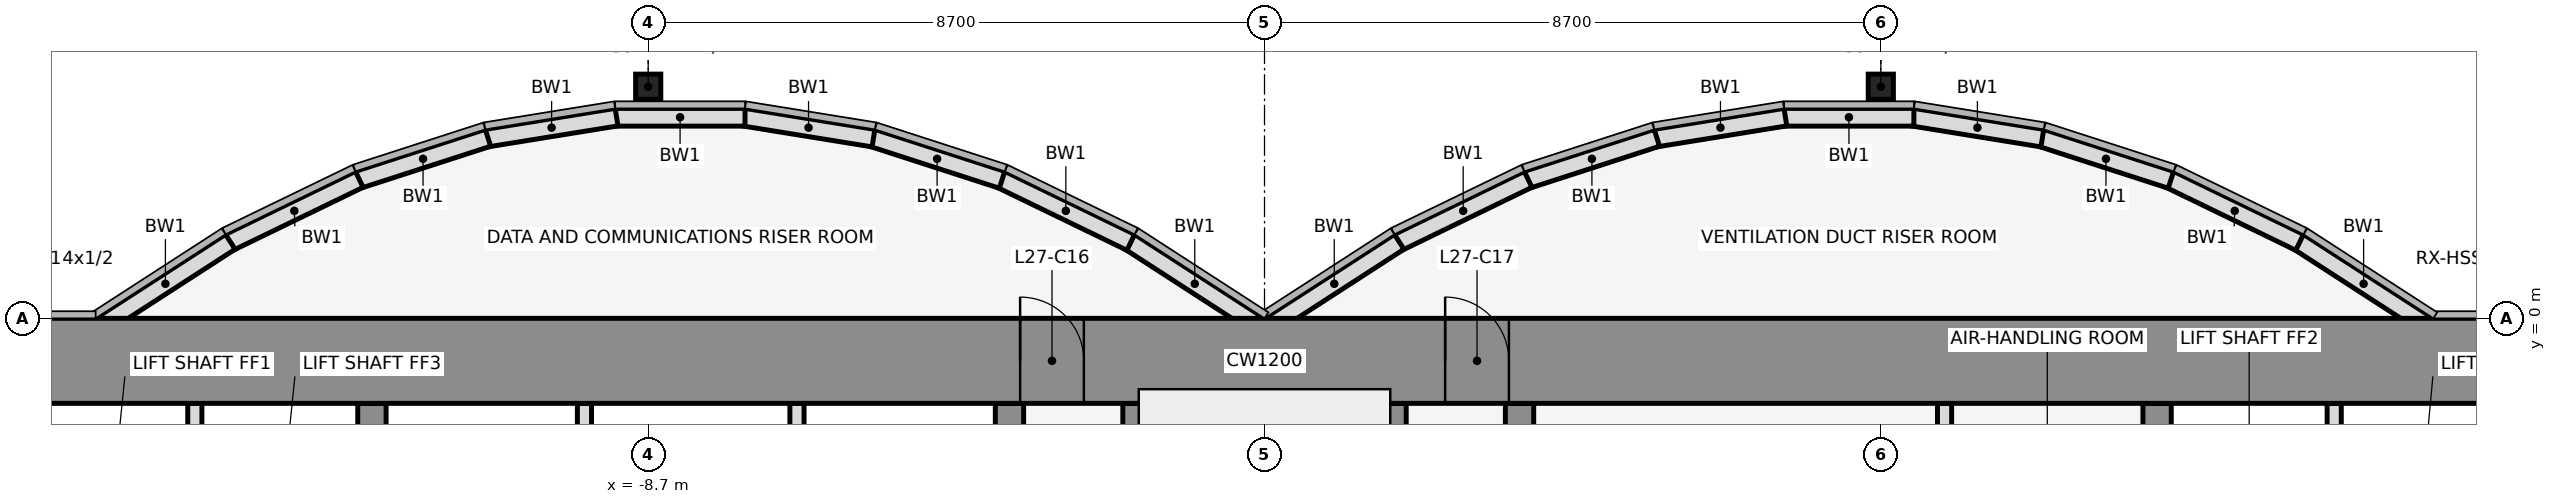
"""IFC4 building model, lengths in metres.
Left out: names, types, materials, properties, quantities, classifications, styles, units other than length and angle.
Written with IfcOpenShell. Run it as: python <this file> out.ifc"""

import sys

from ifc_helpers import new_model, si_unit, direction, frame, frame_2d, origin, origin_2d, place, context, subcontext, project, spatial, rectangle, hollow_rectangle, extrude, element, fill, save


model = new_model("IFC4")
c1 = context("Model", 3, precision=1e-05, world=origin(), true_north=direction((0.0, 1.0)))
c2 = subcontext(c1, "Body", "Model", "MODEL_VIEW")
j1 = project(units=[si_unit("LENGTHUNIT", "METRE"), si_unit("PLANEANGLEUNIT", "RADIAN")], contexts=[c1])
p1 = place(None, origin())
s1 = spatial("IfcSite", under=j1, at=p1, CompositionType="ELEMENT")
p2 = place(p1, origin())
s2 = spatial("IfcBuilding", under=s1, at=p2, CompositionType="ELEMENT")
p3 = place(p2, frame((0.0, 0.0, 126.8)))
s3 = spatial("IfcBuildingStorey", under=s2, at=p3, CompositionType="ELEMENT", Elevation=126.8)
for number, where, z_axis, x_axis in (
    (1, (-8.7, 3.269, 0.0), (0.0, 0.0, 1.0), (1.0, 0.0, 0.0)),
    (2, (8.7, 3.269, 0.0), (0.0, 0.0, 1.0), (1.0, 0.0, 0.0)),
):
    element("IfcColumn", number, at=place(p3, frame(where, z_axis=z_axis, x_axis=x_axis)), inside=s3, PredefinedType="COLUMN", context=c2, shape_type="SweptSolid", body=[
        extrude(hollow_rectangle(XDim=0.356, YDim=0.356, WallThickness=0.012, at=origin_2d()), origin(), (0.0, 0.0, 1.0), 4.1),
    ])
p4 = place(p3, frame((16.432, -0.105, 0.0), z_axis=(0.0, 0.0, 1.0), x_axis=(-0.83981312244, 0.542875602121, 0.0)))
e3 = element("IfcWall", 3, at=p4, inside=s3, PredefinedType="STANDARD", context=c2, shape_type="SweptSolid", body=[
    extrude(rectangle(XDim=2.183, YDim=0.25, at=frame_2d((1.091, 0.0))), origin(), (0.0, 0.0, 1.0), 3.95),
])
p5 = place(p3, frame((14.612, 1.073, 0.0), z_axis=(0.0, 0.0, 1.0), x_axis=(-0.89982408427, 0.436252928206, 0.0)))
e4 = element("IfcWall", 4, at=p5, inside=s3, PredefinedType="STANDARD", context=c2, shape_type="SweptSolid", body=[
    extrude(rectangle(XDim=2.038, YDim=0.25, at=frame_2d((1.019, 0.0))), origin(), (0.0, 0.0, 1.0), 3.95),
])
p6 = place(p3, frame((12.795, 1.955, 0.0), z_axis=(0.0, 0.0, 1.0), x_axis=(-0.951495806175, 0.307661714928, 0.0)))
e5 = element("IfcWall", 5, at=p6, inside=s3, PredefinedType="STANDARD", context=c2, shape_type="SweptSolid", body=[
    extrude(rectangle(XDim=1.927, YDim=0.25, at=frame_2d((0.963, 0.0))), origin(), (0.0, 0.0, 1.0), 3.95),
])
p7 = place(p3, frame((10.98, 2.543, 0.0), z_axis=(0.0, 0.0, 1.0), x_axis=(-0.987181718931, 0.159600293885, 0.0)))
e6 = element("IfcWall", 6, at=p7, inside=s3, PredefinedType="STANDARD", context=c2, shape_type="SweptSolid", body=[
    extrude(rectangle(XDim=1.857, YDim=0.25, at=frame_2d((0.929, 0.0))), origin(), (0.0, 0.0, 1.0), 3.95),
])
p8 = place(p3, frame((9.167, 2.838, 0.0), z_axis=(0.0, 0.0, 1.0), x_axis=(-1.0, 0.0, 0.0)))
e7 = element("IfcWall", 7, at=p8, inside=s3, PredefinedType="STANDARD", context=c2, shape_type="SweptSolid", body=[
    extrude(rectangle(XDim=1.833, YDim=0.25, at=frame_2d((0.917, 0.0))), origin(), (0.0, 0.0, 1.0), 3.95),
])
p9 = place(p3, frame((7.353, 2.84, 0.0), z_axis=(0.0, 0.0, 1.0), x_axis=(-0.987181718931, -0.159600293885, 0.0)))
e8 = element("IfcWall", 8, at=p9, inside=s3, PredefinedType="STANDARD", context=c2, shape_type="SweptSolid", body=[
    extrude(rectangle(XDim=1.857, YDim=0.25, at=frame_2d((0.929, 0.0))), origin(), (0.0, 0.0, 1.0), 3.95),
])
p10 = place(p3, frame((5.538, 2.548, 0.0), z_axis=(0.0, 0.0, 1.0), x_axis=(-0.951495806175, -0.307661714928, 0.0)))
e9 = element("IfcWall", 9, at=p10, inside=s3, PredefinedType="STANDARD", context=c2, shape_type="SweptSolid", body=[
    extrude(rectangle(XDim=1.927, YDim=0.25, at=frame_2d((0.963, 0.0))), origin(), (0.0, 0.0, 1.0), 3.95),
])
p11 = place(p3, frame((3.721, 1.962, 0.0), z_axis=(0.0, 0.0, 1.0), x_axis=(-0.89982408427, -0.436252928206, 0.0)))
e10 = element("IfcWall", 10, at=p11, inside=s3, PredefinedType="STANDARD", context=c2, shape_type="SweptSolid", body=[
    extrude(rectangle(XDim=2.038, YDim=0.25, at=frame_2d((1.019, 0.0))), origin(), (0.0, 0.0, 1.0), 3.95),
])
for number, where, z_axis, x_axis in (
    (11, (1.901, 1.08, 0.0), (0.0, 0.0, 1.0), (-0.84, -0.543, 0.0)),
    (12, (-0.068, -0.105, 0.0), (0.0, 0.0, 1.0), (-0.84, 0.543, 0.0)),
):
    element("IfcWall", number, at=place(p3, frame(where, z_axis=z_axis, x_axis=x_axis)), inside=s3, PredefinedType="STANDARD", context=c2, shape_type="SweptSolid", body=[
        extrude(rectangle(XDim=2.183, YDim=0.25, at=frame_2d((1.091, 0.0))), origin(), (0.0, 0.0, 1.0), 3.95),
    ])
p12 = place(p3, frame((-1.888, 1.073, 0.0), z_axis=(0.0, 0.0, 1.0), x_axis=(-0.89982408427, 0.436252928206, 0.0)))
e13 = element("IfcWall", 13, at=p12, inside=s3, PredefinedType="STANDARD", context=c2, shape_type="SweptSolid", body=[
    extrude(rectangle(XDim=2.038, YDim=0.25, at=frame_2d((1.019, 0.0))), origin(), (0.0, 0.0, 1.0), 3.95),
])
p13 = place(p3, frame((-3.705, 1.955, 0.0), z_axis=(0.0, 0.0, 1.0), x_axis=(-0.951495806175, 0.307661714928, 0.0)))
e14 = element("IfcWall", 14, at=p13, inside=s3, PredefinedType="STANDARD", context=c2, shape_type="SweptSolid", body=[
    extrude(rectangle(XDim=1.927, YDim=0.25, at=frame_2d((0.963, 0.0))), origin(), (0.0, 0.0, 1.0), 3.95),
])
p14 = place(p3, frame((-5.52, 2.543, 0.0), z_axis=(0.0, 0.0, 1.0), x_axis=(-0.987181718931, 0.159600293885, 0.0)))
e15 = element("IfcWall", 15, at=p14, inside=s3, PredefinedType="STANDARD", context=c2, shape_type="SweptSolid", body=[
    extrude(rectangle(XDim=1.857, YDim=0.25, at=frame_2d((0.929, 0.0))), origin(), (0.0, 0.0, 1.0), 3.95),
])
p15 = place(p3, frame((-7.333, 2.838, 0.0), z_axis=(0.0, 0.0, 1.0), x_axis=(-1.0, 0.0, 0.0)))
e16 = element("IfcWall", 16, at=p15, inside=s3, PredefinedType="STANDARD", context=c2, shape_type="SweptSolid", body=[
    extrude(rectangle(XDim=1.833, YDim=0.25, at=frame_2d((0.917, 0.0))), origin(), (0.0, 0.0, 1.0), 3.95),
])
p16 = place(p3, frame((-9.147, 2.84, 0.0), z_axis=(0.0, 0.0, 1.0), x_axis=(-0.987181718931, -0.159600293885, 0.0)))
e17 = element("IfcWall", 17, at=p16, inside=s3, PredefinedType="STANDARD", context=c2, shape_type="SweptSolid", body=[
    extrude(rectangle(XDim=1.857, YDim=0.25, at=frame_2d((0.929, 0.0))), origin(), (0.0, 0.0, 1.0), 3.95),
])
p17 = place(p3, frame((-10.962, 2.548, 0.0), z_axis=(0.0, 0.0, 1.0), x_axis=(-0.951495806175, -0.307661714928, 0.0)))
e18 = element("IfcWall", 18, at=p17, inside=s3, PredefinedType="STANDARD", context=c2, shape_type="SweptSolid", body=[
    extrude(rectangle(XDim=1.927, YDim=0.25, at=frame_2d((0.963, 0.0))), origin(), (0.0, 0.0, 1.0), 3.95),
])
p18 = place(p3, frame((-12.779, 1.962, 0.0), z_axis=(0.0, 0.0, 1.0), x_axis=(-0.89982408427, -0.436252928206, 0.0)))
e19 = element("IfcWall", 19, at=p18, inside=s3, PredefinedType="STANDARD", context=c2, shape_type="SweptSolid", body=[
    extrude(rectangle(XDim=2.038, YDim=0.25, at=frame_2d((1.019, 0.0))), origin(), (0.0, 0.0, 1.0), 3.95),
])
p19 = place(p3, frame((-14.599, 1.08, 0.0), z_axis=(0.0, 0.0, 1.0), x_axis=(-0.83981312244, -0.542875602121, 0.0)))
e20 = element("IfcWall", 20, at=p19, inside=s3, PredefinedType="STANDARD", context=c2, shape_type="SweptSolid", body=[
    extrude(rectangle(XDim=2.183, YDim=0.25, at=frame_2d((1.091, 0.0))), origin(), (0.0, 0.0, 1.0), 3.95),
])
p20 = place(p3, frame((-15.1, -4.6, 0.0), z_axis=(0.0, 0.0, 1.0), x_axis=(0.0, 1.0, 0.0)))
e21 = element("IfcWall", 21, at=p20, inside=s3, PredefinedType="PARTITIONING", context=c2, shape_type="SweptSolid", body=[
    extrude(rectangle(XDim=3.4, YDim=0.2, at=frame_2d((1.7, 0.0))), origin(), (0.0, 0.0, 1.0), 2.939),
])
p21 = place(p3, frame((-12.6, -11.8, 0.0), z_axis=(0.0, 0.0, 1.0), x_axis=(0.0, 1.0, 0.0)))
e22 = element("IfcWall", 22, at=p21, inside=s3, PredefinedType="SHEAR", context=c2, shape_type="SweptSolid", body=[
    extrude(rectangle(XDim=10.6, YDim=0.4, at=frame_2d((5.3, 0.0))), origin(), (0.0, 0.0, 1.0), 4.1),
])
p22 = place(p21, frame((4.75, 0.0, 0.0)))
e23 = element("IfcOpeningElement", 23, at=p22, cuts=e22, PredefinedType="OPENING", context=c2, shape_type="SweptSolid", body=[
    extrude(rectangle(XDim=1.1, YDim=2.1, at=frame_2d((0.55, 1.05))), frame((0.0, 0.212, 0.0), z_axis=(0.0, -1.0, 0.0), x_axis=(1.0, 0.0, 0.0)), (0.0, 0.0, 1.0), 0.424),
])
for number, where, z_axis, x_axis in (
    (24, (-9.6, -4.6, 0.0), (0.0, 0.0, 1.0), (0.0, 1.0, 0.0)),
    (25, (-6.6, -4.6, 0.0), (0.0, 0.0, 1.0), (0.0, 1.0, 0.0)),
):
    element("IfcWall", number, at=place(p3, frame(where, z_axis=z_axis, x_axis=x_axis)), inside=s3, PredefinedType="PARTITIONING", context=c2, shape_type="SweptSolid", body=[
        extrude(rectangle(XDim=3.4, YDim=0.2, at=frame_2d((1.7, 0.0))), origin(), (0.0, 0.0, 1.0), 2.939),
    ])
p23 = place(p3, frame((-3.6, -11.8, 0.0), z_axis=(0.0, 0.0, 1.0), x_axis=(0.0, 1.0, 0.0)))
e26 = element("IfcWall", 26, at=p23, inside=s3, PredefinedType="SHEAR", context=c2, shape_type="SweptSolid", body=[
    extrude(rectangle(XDim=10.6, YDim=0.4, at=frame_2d((5.3, 0.0))), origin(), (0.0, 0.0, 1.0), 4.1),
])
p24 = place(p23, frame((4.85, 0.0, 0.0)))
e27 = element("IfcOpeningElement", 27, at=p24, cuts=e26, PredefinedType="OPENING", context=c2, shape_type="SweptSolid", body=[
    extrude(rectangle(XDim=0.9, YDim=2.1, at=frame_2d((0.45, 1.05))), frame((0.0, 0.212, 0.0), z_axis=(0.0, -1.0, 0.0), x_axis=(1.0, 0.0, 0.0)), (0.0, 0.0, 1.0), 0.424),
])
for number, where, z_axis, x_axis in (
    (28, (-1.8, -11.8, 0.0), (0.0, 0.0, 1.0), (0.0, 1.0, 0.0)),
    (29, (1.8, -11.8, 0.0), (0.0, 0.0, 1.0), (0.0, 1.0, 0.0)),
):
    element("IfcWall", number, at=place(p3, frame(where, z_axis=z_axis, x_axis=x_axis)), inside=s3, PredefinedType="SHEAR", context=c2, shape_type="SweptSolid", body=[
        extrude(rectangle(XDim=10.6, YDim=0.4, at=frame_2d((5.3, 0.0))), origin(), (0.0, 0.0, 1.0), 4.1),
    ])
p25 = place(p3, frame((3.6, -11.8, 0.0), z_axis=(0.0, 0.0, 1.0), x_axis=(0.0, 1.0, 0.0)))
e30 = element("IfcWall", 30, at=p25, inside=s3, PredefinedType="SHEAR", context=c2, shape_type="SweptSolid", body=[
    extrude(rectangle(XDim=10.6, YDim=0.4, at=frame_2d((5.3, 0.0))), origin(), (0.0, 0.0, 1.0), 4.1),
])
p26 = place(p25, frame((1.35, 0.0, 0.0)))
e31 = element("IfcOpeningElement", 31, at=p26, cuts=e30, PredefinedType="OPENING", context=c2, shape_type="SweptSolid", body=[
    extrude(rectangle(XDim=0.9, YDim=2.1, at=frame_2d((0.45, 1.05))), frame((0.0, 0.212, 0.0), z_axis=(0.0, -1.0, 0.0), x_axis=(1.0, 0.0, 0.0)), (0.0, 0.0, 1.0), 0.424),
])
p27 = place(p3, frame((9.6, -4.6, 0.0), z_axis=(0.0, 0.0, 1.0), x_axis=(0.0, 1.0, 0.0)))
e32 = element("IfcWall", 32, at=p27, inside=s3, PredefinedType="PARTITIONING", context=c2, shape_type="SweptSolid", body=[
    extrude(rectangle(XDim=3.4, YDim=0.2, at=frame_2d((1.7, 0.0))), origin(), (0.0, 0.0, 1.0), 2.939),
])
p28 = place(p3, frame((12.6, -11.8, 0.0), z_axis=(0.0, 0.0, 1.0), x_axis=(0.0, 1.0, 0.0)))
e33 = element("IfcWall", 33, at=p28, inside=s3, PredefinedType="SHEAR", context=c2, shape_type="SweptSolid", body=[
    extrude(rectangle(XDim=10.6, YDim=0.4, at=frame_2d((5.3, 0.0))), origin(), (0.0, 0.0, 1.0), 4.1),
])
p29 = place(p28, frame((4.75, 0.0, 0.0)))
e34 = element("IfcOpeningElement", 34, at=p29, cuts=e33, PredefinedType="OPENING", context=c2, shape_type="SweptSolid", body=[
    extrude(rectangle(XDim=1.1, YDim=2.1, at=frame_2d((0.55, 1.05))), frame((0.0, 0.212, 0.0), z_axis=(0.0, -1.0, 0.0), x_axis=(1.0, 0.0, 0.0)), (0.0, 0.0, 1.0), 0.424),
])
p30 = place(p3, frame((15.1, -4.6, 0.0), z_axis=(0.0, 0.0, 1.0), x_axis=(0.0, 1.0, 0.0)))
e35 = element("IfcWall", 35, at=p30, inside=s3, PredefinedType="PARTITIONING", context=c2, shape_type="SweptSolid", body=[
    extrude(rectangle(XDim=3.4, YDim=0.2, at=frame_2d((1.7, 0.0))), origin(), (0.0, 0.0, 1.0), 2.939),
])
p31 = place(p3, frame((-22.0, -0.6, 0.0), z_axis=(0.0, 0.0, 1.0), x_axis=(1.0, 0.0, 0.0)))
e36 = element("IfcWall", 36, at=p31, inside=s3, PredefinedType="SHEAR", context=c2, shape_type="SweptSolid", body=[
    extrude(rectangle(XDim=44.0, YDim=1.2, at=frame_2d((22.0, 0.0))), origin(), (0.0, 0.0, 1.0), 4.1),
])
p32 = place(p31, frame((18.55, 0.0, 0.0)))
e37 = element("IfcOpeningElement", 37, at=p32, cuts=e36, PredefinedType="OPENING", context=c2, shape_type="SweptSolid", body=[
    extrude(rectangle(XDim=0.9, YDim=2.1, at=frame_2d((0.45, 1.05))), frame((0.0, 0.612, 0.0), z_axis=(0.0, -1.0, 0.0), x_axis=(1.0, 0.0, 0.0)), (0.0, 0.0, 1.0), 1.224),
])
p33 = place(p31, frame((24.55, 0.0, 0.0)))
e38 = element("IfcOpeningElement", 38, at=p33, cuts=e36, PredefinedType="OPENING", context=c2, shape_type="SweptSolid", body=[
    extrude(rectangle(XDim=0.9, YDim=2.1, at=frame_2d((0.45, 1.05))), frame((0.0, 0.612, 0.0), z_axis=(0.0, -1.0, 0.0), x_axis=(1.0, 0.0, 0.0)), (0.0, 0.0, 1.0), 1.224),
])
p34 = place(p32, origin())
e39 = element("IfcDoor", 39, at=p34, inside=s3, OperationType="SINGLE_SWING_LEFT", PredefinedType="DOOR", context=c2, shape_type="SweptSolid", body=[
    extrude(rectangle(XDim=0.9, YDim=2.1, at=frame_2d((0.45, 1.05))), frame((0.0, 0.025, 0.0), z_axis=(0.0, -1.0, 0.0), x_axis=(1.0, 0.0, 0.0)), (0.0, 0.0, 1.0), 0.05),
])
fill(e37, e39)
p35 = place(p33, origin())
e40 = element("IfcDoor", 40, at=p35, inside=s3, OperationType="SINGLE_SWING_LEFT", PredefinedType="DOOR", context=c2, shape_type="SweptSolid", body=[
    extrude(rectangle(XDim=0.9, YDim=2.1, at=frame_2d((0.45, 1.05))), frame((0.0, 0.025, 0.0), z_axis=(0.0, -1.0, 0.0), x_axis=(1.0, 0.0, 0.0)), (0.0, 0.0, 1.0), 0.05),
])
fill(e38, e40)
save(model, sys.argv[1])
